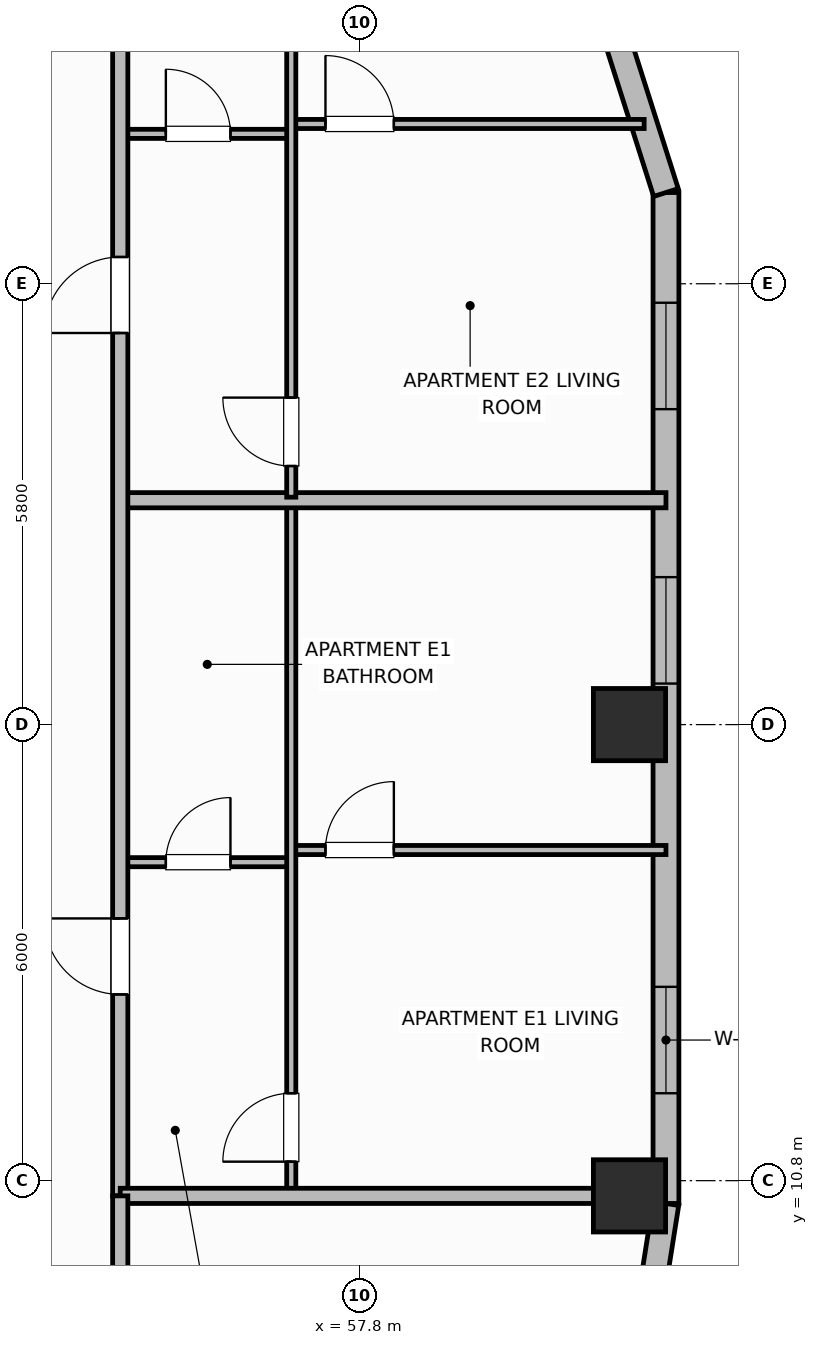
"""IFC4 building model, lengths in metres.
Left out: names, types, materials, properties, quantities, classifications, styles, units other than length and angle.
Written with IfcOpenShell. Run it as: python <this file> out.ifc"""

import sys

from ifc_helpers import new_model, si_unit, direction, frame, frame_2d, origin, origin_2d, place, context, subcontext, project, spatial, rectangle, extrude, element, fill, save


model = new_model("IFC4")
c1 = context("Model", 3, precision=1e-05, world=origin(), true_north=direction((0.0, 1.0)))
c2 = subcontext(c1, "Body", "Model", "MODEL_VIEW")
j1 = project(units=[si_unit("LENGTHUNIT", "METRE"), si_unit("PLANEANGLEUNIT", "RADIAN")], contexts=[c1])
p1 = place(None, origin())
s1 = spatial("IfcSite", under=j1, at=p1, CompositionType="ELEMENT")
p2 = place(p1, origin())
s2 = spatial("IfcBuilding", under=s1, at=p2, CompositionType="ELEMENT")
p3 = place(p2, frame((0.0, 0.0, 184.8)))
s3 = spatial("IfcBuildingStorey", under=s2, at=p3, CompositionType="ELEMENT", Elevation=184.8)
for number, where, z_axis, x_axis in (
    (1, (61.35, 10.6, 0.0), (0.0, 0.0, 1.0), (1.0, 0.0, 0.0)),
    (2, (61.35, 16.8, 0.0), (0.0, 0.0, 1.0), (1.0, 0.0, 0.0)),
):
    element("IfcColumn", number, at=place(p3, frame(where, z_axis=z_axis, x_axis=x_axis)), inside=s3, PredefinedType="COLUMN", context=c2, shape_type="SweptSolid", body=[
        extrude(rectangle(XDim=0.95, YDim=0.95, at=origin_2d()), origin(), (0.0, 0.0, 1.0), 3.7),
    ])
p4 = place(p3, frame((61.652, 9.378, 0.0), z_axis=(0.0, 0.0, 1.0), x_axis=(0.156514556949, 0.987675651954, 0.0)))
e3 = element("IfcWall", 3, at=p4, inside=s3, PredefinedType="SOLIDWALL", context=c2, shape_type="SweptSolid", body=[
    extrude(rectangle(XDim=1.135, YDim=0.34, at=frame_2d((0.568, 0.0))), origin(), (0.0, 0.0, 1.0), 2.72),
])
p5 = place(p3, frame((61.83, 10.5, 0.0), z_axis=(0.0, 0.0, 1.0), x_axis=(0.0, 1.0, 0.0)))
e4 = element("IfcWall", 4, at=p5, inside=s3, PredefinedType="SOLIDWALL", context=c2, shape_type="SweptSolid", body=[
    extrude(rectangle(XDim=13.3, YDim=0.34, at=frame_2d((6.65, 0.0))), origin(), (0.0, 0.0, 1.0), 2.72),
])
p6 = place(p5, frame((1.45, 0.0, 0.75)))
e5 = element("IfcOpeningElement", 5, at=p6, cuts=e4, PredefinedType="OPENING", context=c2, shape_type="SweptSolid", body=[
    extrude(rectangle(XDim=1.4, YDim=1.85, at=frame_2d((0.7, 0.925))), frame((0.0, 0.18, 0.0), z_axis=(0.0, -1.0, 0.0), x_axis=(1.0, 0.0, 0.0)), (0.0, 0.0, 1.0), 0.36),
])
p7 = place(p5, frame((6.84, 0.0, 0.71)))
e6 = element("IfcOpeningElement", 6, at=p7, cuts=e4, PredefinedType="OPENING", context=c2, shape_type="SweptSolid", body=[
    extrude(rectangle(XDim=1.4, YDim=1.85, at=frame_2d((0.7, 0.925))), frame((0.0, 0.18, 0.0), z_axis=(0.0, -1.0, 0.0), x_axis=(1.0, 0.0, 0.0)), (0.0, 0.0, 1.0), 0.36),
])
p8 = place(p5, frame((10.45, 0.0, 0.75)))
e7 = element("IfcOpeningElement", 7, at=p8, cuts=e4, PredefinedType="OPENING", context=c2, shape_type="SweptSolid", body=[
    extrude(rectangle(XDim=1.4, YDim=1.85, at=frame_2d((0.7, 0.925))), frame((0.0, 0.18, 0.0), z_axis=(0.0, -1.0, 0.0), x_axis=(1.0, 0.0, 0.0)), (0.0, 0.0, 1.0), 0.36),
])
p9 = place(p3, frame((61.83, 23.8, 0.0), z_axis=(0.0, 0.0, 1.0), x_axis=(-0.303286588318, 0.95289938889, 0.0)))
e8 = element("IfcWall", 8, at=p9, inside=s3, PredefinedType="SOLIDWALL", context=c2, shape_type="SweptSolid", body=[
    extrude(rectangle(XDim=2.309, YDim=0.34, at=frame_2d((1.154, 0.0))), origin(), (0.0, 0.0, 1.0), 2.72),
])
p10 = place(p3, frame((54.65, 14.99, 0.0), z_axis=(0.0, 0.0, 1.0), x_axis=(1.0, 0.0, 0.0)))
e9 = element("IfcWall", 9, at=p10, inside=s3, PredefinedType="PARTITIONING", context=c2, shape_type="SweptSolid", body=[
    extrude(rectangle(XDim=2.25, YDim=0.12, at=frame_2d((1.125, 0.0))), origin(), (0.0, 0.0, 1.0), 2.55),
])
p11 = place(p10, frame((0.6, 0.0, 0.0)))
e10 = element("IfcOpeningElement", 10, at=p11, cuts=e9, PredefinedType="OPENING", context=c2, shape_type="SweptSolid", body=[
    extrude(rectangle(XDim=0.85, YDim=2.1, at=frame_2d((0.425, 1.05))), frame((0.0, 0.07, 0.0), z_axis=(0.0, -1.0, 0.0), x_axis=(1.0, 0.0, 0.0)), (0.0, 0.0, 1.0), 0.14),
])
p12 = place(p3, frame((56.9, 15.15, 0.0), z_axis=(0.0, 0.0, 1.0), x_axis=(1.0, 0.0, 0.0)))
e11 = element("IfcWall", 11, at=p12, inside=s3, PredefinedType="PARTITIONING", context=c2, shape_type="SweptSolid", body=[
    extrude(rectangle(XDim=4.93, YDim=0.12, at=frame_2d((2.465, 0.0))), origin(), (0.0, 0.0, 1.0), 2.55),
])
p13 = place(p12, frame((0.45, 0.0, 0.0)))
e12 = element("IfcOpeningElement", 12, at=p13, cuts=e11, PredefinedType="OPENING", context=c2, shape_type="SweptSolid", body=[
    extrude(rectangle(XDim=0.9, YDim=2.1, at=frame_2d((0.45, 1.05))), frame((0.0, 0.07, 0.0), z_axis=(0.0, -1.0, 0.0), x_axis=(1.0, 0.0, 0.0)), (0.0, 0.0, 1.0), 0.14),
])
p14 = place(p3, frame((56.9, 10.64, 0.0), z_axis=(0.0, 0.0, 1.0), x_axis=(0.0, 1.0, 0.0)))
e13 = element("IfcWall", 13, at=p14, inside=s3, PredefinedType="PARTITIONING", context=c2, shape_type="SweptSolid", body=[
    extrude(rectangle(XDim=9.072, YDim=0.12, at=frame_2d((4.536, 0.0))), origin(), (0.0, 0.0, 1.0), 2.55),
])
p15 = place(p14, frame((0.41, 0.0, 0.0)))
e14 = element("IfcOpeningElement", 14, at=p15, cuts=e13, PredefinedType="OPENING", context=c2, shape_type="SweptSolid", body=[
    extrude(rectangle(XDim=0.9, YDim=2.1, at=frame_2d((0.45, 1.05))), frame((0.0, 0.07, 0.0), z_axis=(0.0, -1.0, 0.0), x_axis=(1.0, 0.0, 0.0)), (0.0, 0.0, 1.0), 0.14),
])
p16 = place(p3, frame((54.65, 19.752, 0.0), z_axis=(0.0, 0.0, 1.0), x_axis=(1.0, 0.0, 0.0)))
e15 = element("IfcWall", 15, at=p16, inside=s3, PredefinedType="PARTITIONING", context=c2, shape_type="SweptSolid", body=[
    extrude(rectangle(XDim=7.18, YDim=0.2, at=frame_2d((3.59, 0.0))), origin(), (0.0, 0.0, 1.0), 2.55),
])
p17 = place(p3, frame((54.65, 24.572, 0.0), z_axis=(0.0, 0.0, 1.0), x_axis=(1.0, 0.0, 0.0)))
e16 = element("IfcWall", 16, at=p17, inside=s3, PredefinedType="PARTITIONING", context=c2, shape_type="SweptSolid", body=[
    extrude(rectangle(XDim=2.25, YDim=0.12, at=frame_2d((1.125, 0.0))), origin(), (0.0, 0.0, 1.0), 2.55),
])
p18 = place(p17, frame((0.6, 0.0, 0.0)))
e17 = element("IfcOpeningElement", 17, at=p18, cuts=e16, PredefinedType="OPENING", context=c2, shape_type="SweptSolid", body=[
    extrude(rectangle(XDim=0.85, YDim=2.1, at=frame_2d((0.425, 1.05))), frame((0.0, 0.07, 0.0), z_axis=(0.0, -1.0, 0.0), x_axis=(1.0, 0.0, 0.0)), (0.0, 0.0, 1.0), 0.14),
])
p19 = place(p3, frame((56.9, 24.702, 0.0), z_axis=(0.0, 0.0, 1.0), x_axis=(1.0, 0.0, 0.0)))
e18 = element("IfcWall", 18, at=p19, inside=s3, PredefinedType="PARTITIONING", context=c2, shape_type="SweptSolid", body=[
    extrude(rectangle(XDim=4.643, YDim=0.12, at=frame_2d((2.322, 0.0))), origin(), (0.0, 0.0, 1.0), 2.55),
])
p20 = place(p19, frame((0.45, 0.0, 0.0)))
e19 = element("IfcOpeningElement", 19, at=p20, cuts=e18, PredefinedType="OPENING", context=c2, shape_type="SweptSolid", body=[
    extrude(rectangle(XDim=0.9, YDim=2.1, at=frame_2d((0.45, 1.05))), frame((0.0, 0.07, 0.0), z_axis=(0.0, -1.0, 0.0), x_axis=(1.0, 0.0, 0.0)), (0.0, 0.0, 1.0), 0.14),
])
p21 = place(p3, frame((56.9, 19.792, 0.0), z_axis=(0.0, 0.0, 1.0), x_axis=(0.0, 1.0, 0.0)))
e20 = element("IfcWall", 20, at=p21, inside=s3, PredefinedType="PARTITIONING", context=c2, shape_type="SweptSolid", body=[
    extrude(rectangle(XDim=9.968, YDim=0.12, at=frame_2d((4.984, 0.0))), origin(), (0.0, 0.0, 1.0), 2.55),
])
p22 = place(p21, frame((0.41, 0.0, 0.0)))
e21 = element("IfcOpeningElement", 21, at=p22, cuts=e20, PredefinedType="OPENING", context=c2, shape_type="SweptSolid", body=[
    extrude(rectangle(XDim=0.9, YDim=2.1, at=frame_2d((0.45, 1.05))), frame((0.0, 0.07, 0.0), z_axis=(0.0, -1.0, 0.0), x_axis=(1.0, 0.0, 0.0)), (0.0, 0.0, 1.0), 0.14),
])
p23 = place(p3, frame((54.65, 10.6, 0.0), z_axis=(0.0, 0.0, 1.0), x_axis=(0.0, 1.0, 0.0)))
e22 = element("IfcWall", 22, at=p23, inside=s3, PredefinedType="PARTITIONING", context=c2, shape_type="SweptSolid", body=[
    extrude(rectangle(XDim=35.2, YDim=0.2, at=frame_2d((17.6, 0.0))), origin(), (0.0, 0.0, 1.0), 2.55),
])
p24 = place(p23, frame((2.65, 0.0, 0.0)))
e23 = element("IfcOpeningElement", 23, at=p24, cuts=e22, PredefinedType="OPENING", context=c2, shape_type="SweptSolid", body=[
    extrude(rectangle(XDim=1.0, YDim=2.15, at=frame_2d((0.5, 1.075))), frame((0.0, 0.11, 0.0), z_axis=(0.0, -1.0, 0.0), x_axis=(1.0, 0.0, 0.0)), (0.0, 0.0, 1.0), 0.22),
])
p25 = place(p23, frame((11.352, 0.0, 0.0)))
e24 = element("IfcOpeningElement", 24, at=p25, cuts=e22, PredefinedType="OPENING", context=c2, shape_type="SweptSolid", body=[
    extrude(rectangle(XDim=1.0, YDim=2.15, at=frame_2d((0.5, 1.075))), frame((0.0, 0.11, 0.0), z_axis=(0.0, -1.0, 0.0), x_axis=(1.0, 0.0, 0.0)), (0.0, 0.0, 1.0), 0.22),
])
p26 = place(p23, frame((21.37, 0.0, 0.0)))
e25 = element("IfcOpeningElement", 25, at=p26, cuts=e22, PredefinedType="OPENING", context=c2, shape_type="SweptSolid", body=[
    extrude(rectangle(XDim=1.0, YDim=2.15, at=frame_2d((0.5, 1.075))), frame((0.0, 0.11, 0.0), z_axis=(0.0, -1.0, 0.0), x_axis=(1.0, 0.0, 0.0)), (0.0, 0.0, 1.0), 0.22),
])
p27 = place(p23, frame((27.302, 0.0, 0.0)))
e26 = element("IfcOpeningElement", 26, at=p27, cuts=e22, PredefinedType="OPENING", context=c2, shape_type="SweptSolid", body=[
    extrude(rectangle(XDim=1.0, YDim=2.15, at=frame_2d((0.5, 1.075))), frame((0.0, 0.11, 0.0), z_axis=(0.0, -1.0, 0.0), x_axis=(1.0, 0.0, 0.0)), (0.0, 0.0, 1.0), 0.22),
])
p28 = place(p3, frame((54.65, 10.6, 0.0), z_axis=(0.0, 0.0, 1.0), x_axis=(1.0, 0.0, 0.0)))
e27 = element("IfcWall", 27, at=p28, inside=s3, PredefinedType="PARTITIONING", context=c2, shape_type="SweptSolid", body=[
    extrude(rectangle(XDim=6.76, YDim=0.2, at=frame_2d((3.38, 0.0))), origin(), (0.0, 0.0, 1.0), 2.55),
])
p29 = place(p3, frame((54.65, 6.87, 0.0), z_axis=(0.0, 0.0, 1.0), x_axis=(0.0, 1.0, 0.0)))
e28 = element("IfcWall", 28, at=p29, inside=s3, PredefinedType="PARTITIONING", context=c2, shape_type="SweptSolid", body=[
    extrude(rectangle(XDim=3.73, YDim=0.2, at=frame_2d((1.865, 0.0))), origin(), (0.0, 0.0, 1.0), 2.55),
])
p30 = place(p6, origin())
e29 = element("IfcWindow", 29, at=p30, inside=s3, PartitioningType="SINGLE_PANEL", PredefinedType="WINDOW", context=c2, shape_type="SweptSolid", body=[
    extrude(rectangle(XDim=1.4, YDim=1.85, at=frame_2d((0.7, 0.925))), frame((0.0, 0.03, 0.0), z_axis=(0.0, -1.0, 0.0), x_axis=(1.0, 0.0, 0.0)), (0.0, 0.0, 1.0), 0.06),
])
fill(e5, e29)
p31 = place(p7, origin())
e30 = element("IfcWindow", 30, at=p31, inside=s3, PartitioningType="SINGLE_PANEL", PredefinedType="WINDOW", context=c2, shape_type="SweptSolid", body=[
    extrude(rectangle(XDim=1.4, YDim=1.85, at=frame_2d((0.7, 0.925))), frame((0.0, 0.03, 0.0), z_axis=(0.0, -1.0, 0.0), x_axis=(1.0, 0.0, 0.0)), (0.0, 0.0, 1.0), 0.06),
])
fill(e6, e30)
p32 = place(p8, origin())
e31 = element("IfcWindow", 31, at=p32, inside=s3, PartitioningType="SINGLE_PANEL", PredefinedType="WINDOW", context=c2, shape_type="SweptSolid", body=[
    extrude(rectangle(XDim=1.4, YDim=1.85, at=frame_2d((0.7, 0.925))), frame((0.0, 0.03, 0.0), z_axis=(0.0, -1.0, 0.0), x_axis=(1.0, 0.0, 0.0)), (0.0, 0.0, 1.0), 0.06),
])
fill(e7, e31)
p33 = place(p11, origin())
e32 = element("IfcDoor", 32, at=p33, inside=s3, OperationType="SINGLE_SWING_RIGHT", PredefinedType="DOOR", context=c2, shape_type="SweptSolid", body=[
    extrude(rectangle(XDim=0.85, YDim=2.1, at=frame_2d((0.425, 1.05))), frame((0.0, 0.025, 0.0), z_axis=(0.0, -1.0, 0.0), x_axis=(1.0, 0.0, 0.0)), (0.0, 0.0, 1.0), 0.05),
])
fill(e10, e32)
p34 = place(p13, origin())
e33 = element("IfcDoor", 33, at=p34, inside=s3, OperationType="SINGLE_SWING_RIGHT", PredefinedType="DOOR", context=c2, shape_type="SweptSolid", body=[
    extrude(rectangle(XDim=0.9, YDim=2.1, at=frame_2d((0.45, 1.05))), frame((0.0, 0.025, 0.0), z_axis=(0.0, -1.0, 0.0), x_axis=(1.0, 0.0, 0.0)), (0.0, 0.0, 1.0), 0.05),
])
fill(e12, e33)
p35 = place(p15, origin())
e34 = element("IfcDoor", 34, at=p35, inside=s3, OperationType="SINGLE_SWING_LEFT", PredefinedType="DOOR", context=c2, shape_type="SweptSolid", body=[
    extrude(rectangle(XDim=0.9, YDim=2.1, at=frame_2d((0.45, 1.05))), frame((0.0, 0.025, 0.0), z_axis=(0.0, -1.0, 0.0), x_axis=(1.0, 0.0, 0.0)), (0.0, 0.0, 1.0), 0.05),
])
fill(e14, e34)
p36 = place(p18, origin())
e35 = element("IfcDoor", 35, at=p36, inside=s3, OperationType="SINGLE_SWING_LEFT", PredefinedType="DOOR", context=c2, shape_type="SweptSolid", body=[
    extrude(rectangle(XDim=0.85, YDim=2.1, at=frame_2d((0.425, 1.05))), frame((0.0, 0.025, 0.0), z_axis=(0.0, -1.0, 0.0), x_axis=(1.0, 0.0, 0.0)), (0.0, 0.0, 1.0), 0.05),
])
fill(e17, e35)
p37 = place(p20, origin())
e36 = element("IfcDoor", 36, at=p37, inside=s3, OperationType="SINGLE_SWING_LEFT", PredefinedType="DOOR", context=c2, shape_type="SweptSolid", body=[
    extrude(rectangle(XDim=0.9, YDim=2.1, at=frame_2d((0.45, 1.05))), frame((0.0, 0.025, 0.0), z_axis=(0.0, -1.0, 0.0), x_axis=(1.0, 0.0, 0.0)), (0.0, 0.0, 1.0), 0.05),
])
fill(e19, e36)
p38 = place(p22, origin())
e37 = element("IfcDoor", 37, at=p38, inside=s3, OperationType="SINGLE_SWING_RIGHT", PredefinedType="DOOR", context=c2, shape_type="SweptSolid", body=[
    extrude(rectangle(XDim=0.9, YDim=2.1, at=frame_2d((0.45, 1.05))), frame((0.0, 0.025, 0.0), z_axis=(0.0, -1.0, 0.0), x_axis=(1.0, 0.0, 0.0)), (0.0, 0.0, 1.0), 0.05),
])
fill(e21, e37)
p39 = place(p24, origin())
e38 = element("IfcDoor", 38, at=p39, inside=s3, OperationType="SINGLE_SWING_RIGHT", PredefinedType="DOOR", context=c2, shape_type="SweptSolid", body=[
    extrude(rectangle(XDim=1.0, YDim=2.15, at=frame_2d((0.5, 1.075))), frame((0.0, 0.025, 0.0), z_axis=(0.0, -1.0, 0.0), x_axis=(1.0, 0.0, 0.0)), (0.0, 0.0, 1.0), 0.05),
])
fill(e23, e38)
p40 = place(p25, origin())
e39 = element("IfcDoor", 39, at=p40, inside=s3, OperationType="SINGLE_SWING_LEFT", PredefinedType="DOOR", context=c2, shape_type="SweptSolid", body=[
    extrude(rectangle(XDim=1.0, YDim=2.15, at=frame_2d((0.5, 1.075))), frame((0.0, 0.025, 0.0), z_axis=(0.0, -1.0, 0.0), x_axis=(1.0, 0.0, 0.0)), (0.0, 0.0, 1.0), 0.05),
])
fill(e24, e39)
save(model, sys.argv[1])
